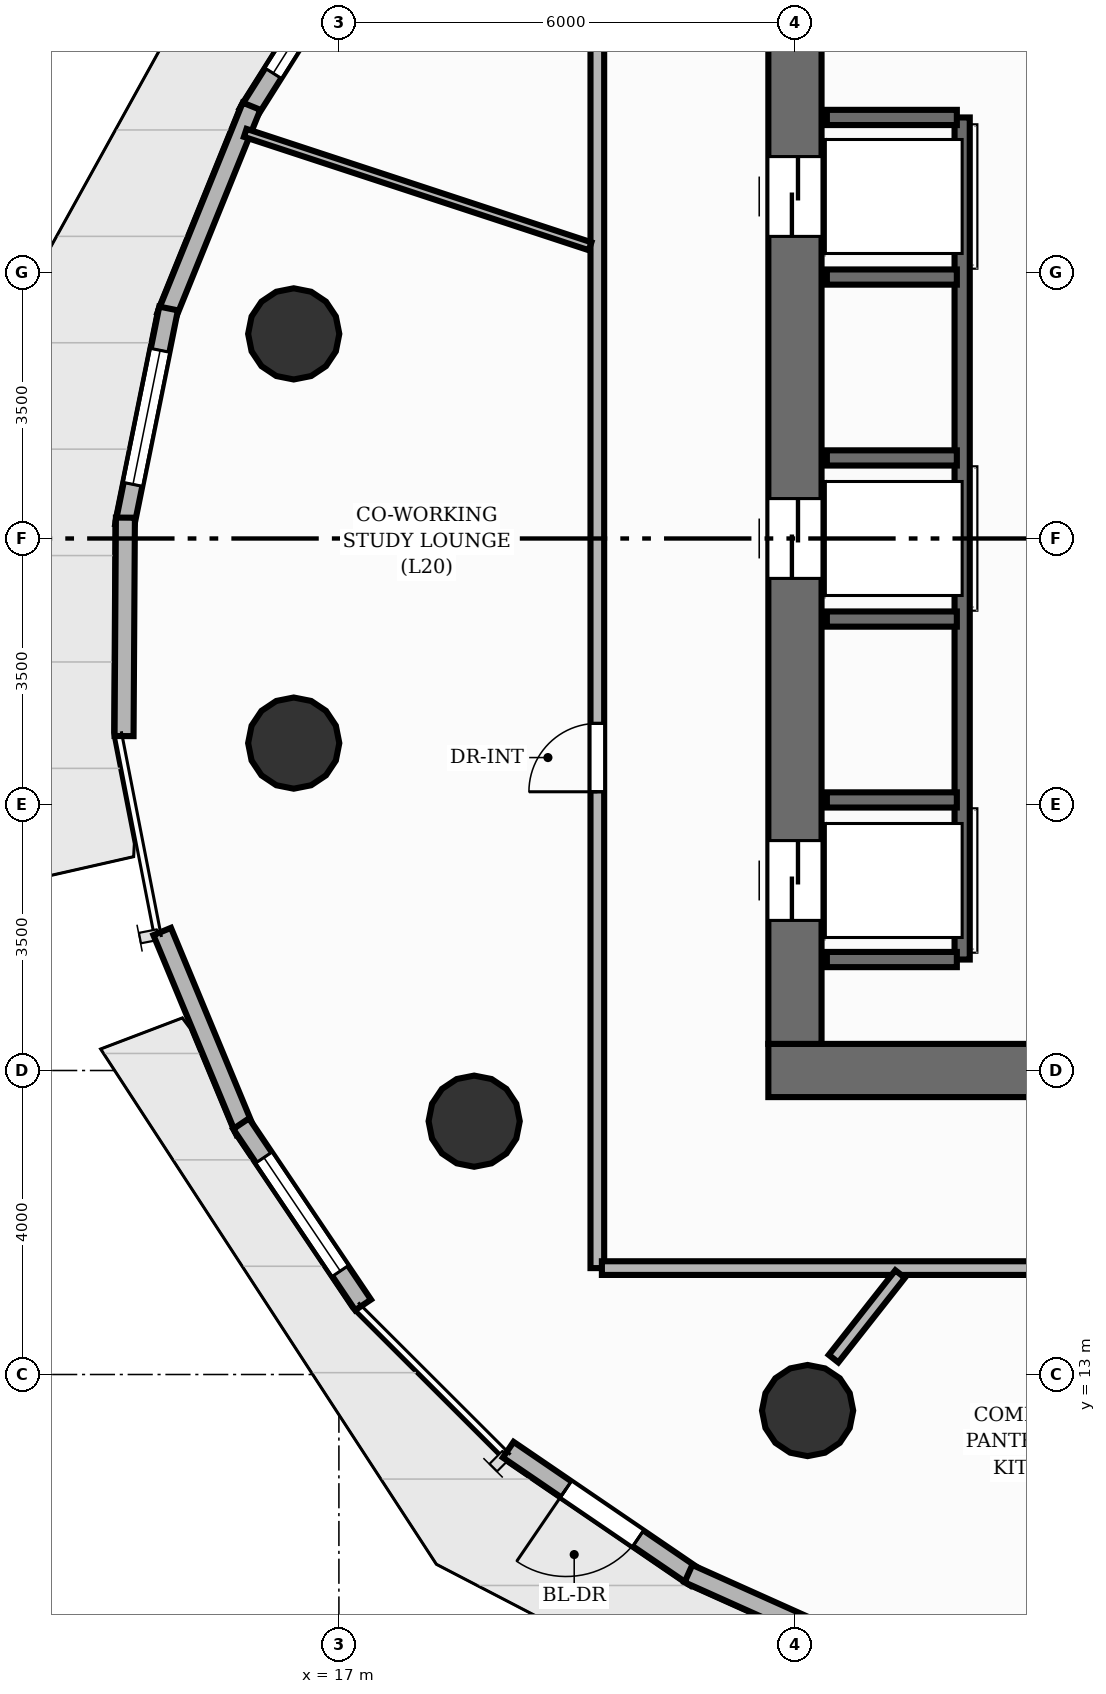
"""IFC4 building model, lengths in metres.
Left out: names, types, materials, properties, quantities, classifications, styles, units other than length and angle.
Written with IfcOpenShell. Run it as: python <this file> out.ifc"""

import sys

from ifc_helpers import new_model, si_unit, direction, frame, frame_2d, origin, origin_2d, place, context, subcontext, project, spatial, rectangle, circle, extrude, element, fill, save


model = new_model("IFC4")
c1 = context("Model", 3, precision=1e-05, world=origin(), true_north=direction((0.0, 1.0)))
c2 = subcontext(c1, "Body", "Model", "MODEL_VIEW")
j1 = project(units=[si_unit("LENGTHUNIT", "METRE"), si_unit("PLANEANGLEUNIT", "RADIAN")], contexts=[c1])
p1 = place(None, origin())
s1 = spatial("IfcSite", under=j1, at=p1, CompositionType="ELEMENT")
p2 = place(p1, origin())
s2 = spatial("IfcBuilding", under=s1, at=p2, CompositionType="ELEMENT")
p3 = place(p2, frame((0.0, 0.0, 70.88)))
s3 = spatial("IfcBuildingStorey", under=s2, at=p3, CompositionType="ELEMENT", Elevation=70.88)
p4 = place(p3, frame((22.65, 17.0, 0.0), z_axis=(0.0, 0.0, 1.0), x_axis=(1.0, 0.0, 0.0)))
e1 = element("IfcWall", 1, at=p4, inside=s3, PredefinedType="SHEAR", context=c2, shape_type="SweptSolid", body=[
    extrude(rectangle(XDim=18.7, YDim=0.7, at=frame_2d((9.35, 0.0))), origin(), (0.0, 0.0, 1.0), 3.2),
])
p5 = place(p4, frame((5.85, 0.0, 0.0)))
e2 = element("IfcOpeningElement", 2, at=p5, cuts=e1, PredefinedType="OPENING", context=c2, shape_type="SweptSolid", body=[
    extrude(rectangle(XDim=1.1, YDim=2.15, at=frame_2d((0.55, 1.075))), frame((0.0, 0.36, 0.0), z_axis=(0.0, -1.0, 0.0), x_axis=(1.0, 0.0, 0.0)), (0.0, 0.0, 1.0), 0.72),
])
p6 = place(p4, frame((9.4, 0.0, 0.0)))
e3 = element("IfcOpeningElement", 3, at=p6, cuts=e1, PredefinedType="OPENING", context=c2, shape_type="SweptSolid", body=[
    extrude(rectangle(XDim=0.9, YDim=2.1, at=frame_2d((0.45, 1.05))), frame((0.0, 0.36, 0.0), z_axis=(0.0, -1.0, 0.0), x_axis=(1.0, 0.0, 0.0)), (0.0, 0.0, 1.0), 0.72),
])
p7 = place(p3, frame((23.0, 17.35, 0.0), z_axis=(0.0, 0.0, 1.0), x_axis=(0.0, 1.0, 0.0)))
e4 = element("IfcWall", 4, at=p7, inside=s3, PredefinedType="SHEAR", context=c2, shape_type="SweptSolid", body=[
    extrude(rectangle(XDim=13.3, YDim=0.7, at=frame_2d((6.65, 0.0))), origin(), (0.0, 0.0, 1.0), 3.2),
])
p8 = place(p7, frame((1.625, 0.0, 0.0)))
e5 = element("IfcOpeningElement", 5, at=p8, cuts=e4, PredefinedType="OPENING", context=c2, shape_type="SweptSolid", body=[
    extrude(rectangle(XDim=1.05, YDim=2.15, at=frame_2d((0.525, 1.075))), frame((0.0, 0.36, 0.0), z_axis=(0.0, -1.0, 0.0), x_axis=(1.0, 0.0, 0.0)), (0.0, 0.0, 1.0), 0.72),
])
p9 = place(p7, frame((6.125, 0.0, 0.0)))
e6 = element("IfcOpeningElement", 6, at=p9, cuts=e4, PredefinedType="OPENING", context=c2, shape_type="SweptSolid", body=[
    extrude(rectangle(XDim=1.05, YDim=2.15, at=frame_2d((0.525, 1.075))), frame((0.0, 0.36, 0.0), z_axis=(0.0, -1.0, 0.0), x_axis=(1.0, 0.0, 0.0)), (0.0, 0.0, 1.0), 0.72),
])
p10 = place(p7, frame((10.625, 0.0, 0.0)))
e7 = element("IfcOpeningElement", 7, at=p10, cuts=e4, PredefinedType="OPENING", context=c2, shape_type="SweptSolid", body=[
    extrude(rectangle(XDim=1.05, YDim=2.15, at=frame_2d((0.525, 1.075))), frame((0.0, 0.36, 0.0), z_axis=(0.0, -1.0, 0.0), x_axis=(1.0, 0.0, 0.0)), (0.0, 0.0, 1.0), 0.72),
])
for number, where, z_axis, x_axis in (
    (8, (16.406, 26.692, 0.0), (0.0, 0.0, 1.0), (1.0, 0.0, 0.0)),
    (9, (16.406, 21.308, 0.0), (0.0, 0.0, 1.0), (1.0, 0.0, 0.0)),
    (10, (18.78, 16.333, 0.0), (0.0, 0.0, 1.0), (1.0, 0.0, 0.0)),
    (11, (23.167, 12.526, 0.0), (0.0, 0.0, 1.0), (1.0, 0.0, 0.0)),
):
    element("IfcColumn", number, at=place(p3, frame(where, z_axis=z_axis, x_axis=x_axis)), inside=s3, PredefinedType="COLUMN", context=c2, shape_type="SweptSolid", body=[
        extrude(circle(Radius=0.6, at=origin_2d()), origin(), (0.0, 0.0, 1.0), 3.2),
    ])
p11 = place(p3, frame((15.799, 29.588, 0.0), z_axis=(0.0, 0.0, 1.0), x_axis=(0.533407635949, 0.845858317871, 0.0)))
e12 = element("IfcWall", 12, at=p11, inside=s3, PredefinedType="SOLIDWALL", context=c2, shape_type="SweptSolid", body=[
    extrude(rectangle(XDim=3.061, YDim=0.25, at=frame_2d((1.53, 0.0))), origin(), (0.0, 0.0, 1.0), 2.96),
])
p12 = place(p11, frame((0.63, 0.0, 0.85)))
e13 = element("IfcOpeningElement", 13, at=p12, cuts=e12, PredefinedType="OPENING", context=c2, shape_type="SweptSolid", body=[
    extrude(rectangle(XDim=1.8, YDim=2.0, at=frame_2d((0.9, 1.0))), frame((0.0, 0.135, 0.0), z_axis=(0.0, -1.0, 0.0), x_axis=(1.0, 0.0, 0.0)), (0.0, 0.0, 1.0), 0.27),
])
p13 = place(p3, frame((14.727, 26.918, 0.0), z_axis=(0.0, 0.0, 1.0), x_axis=(0.376048320415, 0.926600054345, 0.0)))
e14 = element("IfcWall", 14, at=p13, inside=s3, PredefinedType="SOLIDWALL", context=c2, shape_type="SweptSolid", body=[
    extrude(rectangle(XDim=2.988, YDim=0.25, at=frame_2d((1.494, 0.0))), origin(), (0.0, 0.0, 1.0), 2.96),
])
p14 = place(p3, frame((14.179, 24.161, 0.0), z_axis=(0.0, 0.0, 1.0), x_axis=(0.198331811595, 0.980134935868, 0.0)))
e15 = element("IfcWall", 15, at=p14, inside=s3, PredefinedType="SOLIDWALL", context=c2, shape_type="SweptSolid", body=[
    extrude(rectangle(XDim=2.924, YDim=0.25, at=frame_2d((1.462, 0.0))), origin(), (0.0, 0.0, 1.0), 2.96),
])
p15 = place(p14, frame((0.562, 0.0, 0.85)))
e16 = element("IfcOpeningElement", 16, at=p15, cuts=e15, PredefinedType="OPENING", context=c2, shape_type="SweptSolid", body=[
    extrude(rectangle(XDim=1.8, YDim=2.0, at=frame_2d((0.9, 1.0))), frame((0.0, 0.135, 0.0), z_axis=(0.0, -1.0, 0.0), x_axis=(1.0, 0.0, 0.0)), (0.0, 0.0, 1.0), 0.27),
])
p16 = place(p3, frame((14.173, 21.4, 0.0), z_axis=(0.0, 0.0, 1.0), x_axis=(0.006201036057, 0.999980773391, 0.0)))
e17 = element("IfcWall", 17, at=p16, inside=s3, PredefinedType="SOLIDWALL", context=c2, shape_type="SweptSolid", body=[
    extrude(rectangle(XDim=2.874, YDim=0.25, at=frame_2d((1.437, 0.0))), origin(), (0.0, 0.0, 1.0), 2.96),
])
p17 = place(p3, frame((15.767, 16.199, 0.0), z_axis=(0.0, 0.0, 1.0), x_axis=(-0.383525326811, 0.923530358838, 0.0)))
e18 = element("IfcWall", 18, at=p17, inside=s3, PredefinedType="SOLIDWALL", context=c2, shape_type="SweptSolid", body=[
    extrude(rectangle(XDim=2.847, YDim=0.25, at=frame_2d((1.424, 0.0))), origin(), (0.0, 0.0, 1.0), 2.96),
])
p18 = place(p3, frame((17.318, 13.916, 0.0), z_axis=(0.0, 0.0, 1.0), x_axis=(-0.558458439807, 0.829532501478, 0.0)))
e19 = element("IfcWall", 19, at=p18, inside=s3, PredefinedType="SOLIDWALL", context=c2, shape_type="SweptSolid", body=[
    extrude(rectangle(XDim=2.874, YDim=0.25, at=frame_2d((1.437, 0.0))), origin(), (0.0, 0.0, 1.0), 2.96),
])
p19 = place(p18, frame((0.537, 0.0, 0.85)))
e20 = element("IfcOpeningElement", 20, at=p19, cuts=e19, PredefinedType="OPENING", context=c2, shape_type="SweptSolid", body=[
    extrude(rectangle(XDim=1.8, YDim=1.37, at=frame_2d((0.9, 0.685))), frame((0.0, 0.135, 0.0), z_axis=(0.0, -1.0, 0.0), x_axis=(1.0, 0.0, 0.0)), (0.0, 0.0, 1.0), 0.27),
])
p20 = place(p3, frame((21.696, 10.326, 0.0), z_axis=(0.0, 0.0, 1.0), x_axis=(-0.825967987646, 0.56371702421, 0.0)))
e21 = element("IfcWall", 21, at=p20, inside=s3, PredefinedType="SOLIDWALL", context=c2, shape_type="SweptSolid", body=[
    extrude(rectangle(XDim=2.988, YDim=0.25, at=frame_2d((1.494, 0.0))), origin(), (0.0, 0.0, 1.0), 2.96),
])
p21 = place(p20, frame((0.919, 0.0, 0.0)))
e22 = element("IfcOpeningElement", 22, at=p21, cuts=e21, PredefinedType="OPENING", context=c2, shape_type="SweptSolid", body=[
    extrude(rectangle(XDim=1.15, YDim=2.2, at=frame_2d((0.575, 1.1))), frame((0.0, 0.135, 0.0), z_axis=(0.0, -1.0, 0.0), x_axis=(1.0, 0.0, 0.0)), (0.0, 0.0, 1.0), 0.27),
])
p22 = place(p3, frame((24.391, 9.127, 0.0), z_axis=(0.0, 0.0, 1.0), x_axis=(-0.912401485772, 0.40929638254, 0.0)))
e23 = element("IfcWall", 23, at=p22, inside=s3, PredefinedType="SOLIDWALL", context=c2, shape_type="SweptSolid", body=[
    extrude(rectangle(XDim=3.061, YDim=0.25, at=frame_2d((1.53, 0.0))), origin(), (0.0, 0.0, 1.0), 2.96),
])
p23 = place(p3, frame((25.2, 18.46, 0.0), z_axis=(0.0, 0.0, 1.0), x_axis=(0.0, 1.0, 0.0)))
e24 = element("IfcWall", 24, at=p23, inside=s3, PredefinedType="SHEAR", context=c2, shape_type="SweptSolid", body=[
    extrude(rectangle(XDim=11.08, YDim=0.2, at=frame_2d((5.54, 0.0))), origin(), (0.0, 0.0, 1.0), 3.2),
])
for number, where, z_axis, x_axis in (
    (25, (23.42, 18.46, 0.0), (0.0, 0.0, 1.0), (1.0, 0.0, 0.0)),
    (26, (23.42, 29.54, 0.0), (0.0, 0.0, 1.0), (1.0, 0.0, 0.0)),
    (27, (23.42, 20.56, 0.0), (0.0, 0.0, 1.0), (1.0, 0.0, 0.0)),
    (28, (23.42, 22.94, 0.0), (0.0, 0.0, 1.0), (1.0, 0.0, 0.0)),
    (29, (23.42, 25.06, 0.0), (0.0, 0.0, 1.0), (1.0, 0.0, 0.0)),
    (30, (23.42, 27.44, 0.0), (0.0, 0.0, 1.0), (1.0, 0.0, 0.0)),
):
    element("IfcWall", number, at=place(p3, frame(where, z_axis=z_axis, x_axis=x_axis)), inside=s3, PredefinedType="SHEAR", context=c2, shape_type="SweptSolid", body=[
        extrude(rectangle(XDim=1.71, YDim=0.2, at=frame_2d((0.855, 0.0))), origin(), (0.0, 0.0, 1.0), 3.2),
    ])
p24 = place(p3, frame((20.4, 14.4, 0.0), z_axis=(0.0, 0.0, 1.0), x_axis=(0.0, 1.0, 0.0)))
e31 = element("IfcWall", 31, at=p24, inside=s3, PredefinedType="PARTITIONING", context=c2, shape_type="SweptSolid", body=[
    extrude(rectangle(XDim=19.2, YDim=0.18, at=frame_2d((9.6, 0.0))), origin(), (0.0, 0.0, 1.0), 2.955),
])
p25 = place(p24, frame((6.268, 0.0, 0.0)))
e32 = element("IfcOpeningElement", 32, at=p25, cuts=e31, PredefinedType="OPENING", context=c2, shape_type="SweptSolid", body=[
    extrude(rectangle(XDim=0.9, YDim=2.1, at=frame_2d((0.45, 1.05))), frame((0.0, 0.1, 0.0), z_axis=(0.0, -1.0, 0.0), x_axis=(1.0, 0.0, 0.0)), (0.0, 0.0, 1.0), 0.2),
])
p26 = place(p3, frame((43.231, 14.4, 0.0), z_axis=(0.0, 0.0, 1.0), x_axis=(-1.0, 0.0, 0.0)))
e33 = element("IfcWall", 33, at=p26, inside=s3, PredefinedType="PARTITIONING", context=c2, shape_type="SweptSolid", body=[
    extrude(rectangle(XDim=22.771, YDim=0.18, at=frame_2d((11.386, 0.0))), origin(), (0.0, 0.0, 1.0), 2.955),
])
p27 = place(p26, frame((10.968, 0.0, 0.0)))
e34 = element("IfcOpeningElement", 34, at=p27, cuts=e33, PredefinedType="OPENING", context=c2, shape_type="SweptSolid", body=[
    extrude(rectangle(XDim=0.9, YDim=2.1, at=frame_2d((0.45, 1.05))), frame((0.0, 0.1, 0.0), z_axis=(0.0, -1.0, 0.0), x_axis=(1.0, 0.0, 0.0)), (0.0, 0.0, 1.0), 0.2),
])
p28 = place(p26, frame((1.305, 0.0, 0.0)))
e35 = element("IfcOpeningElement", 35, at=p28, cuts=e33, PredefinedType="OPENING", context=c2, shape_type="SweptSolid", body=[
    extrude(rectangle(XDim=0.9, YDim=2.1, at=frame_2d((0.45, 1.05))), frame((0.0, 0.1, 0.0), z_axis=(0.0, -1.0, 0.0), x_axis=(1.0, 0.0, 0.0)), (0.0, 0.0, 1.0), 0.2),
])
p29 = place(p3, frame((20.305, 27.845, 0.0), z_axis=(0.0, 0.0, 1.0), x_axis=(-0.949983665887, 0.312299591013, 0.0)))
e36 = element("IfcWall", 36, at=p29, inside=s3, PredefinedType="MOVABLE", context=c2, shape_type="SweptSolid", body=[
    extrude(rectangle(XDim=4.777, YDim=0.11, at=frame_2d((2.388, 0.0))), origin(), (0.0, 0.0, 1.0), 2.955),
])
p30 = place(p3, frame((24.384, 14.321, 0.0), z_axis=(0.0, 0.0, 1.0), x_axis=(-0.61843050819, -0.785839491589, 0.0)))
e37 = element("IfcWall", 37, at=p30, inside=s3, PredefinedType="PLUMBINGWALL", context=c2, shape_type="SweptSolid", body=[
    extrude(rectangle(XDim=1.416, YDim=0.16, at=frame_2d((0.708, 0.0))), origin(), (0.0, 0.0, 1.0), 2.261),
])
p31 = place(p21, origin())
e38 = element("IfcDoor", 38, at=p31, inside=s3, OperationType="SINGLE_SWING_RIGHT", PredefinedType="DOOR", context=c2, shape_type="SweptSolid", body=[
    extrude(rectangle(XDim=1.15, YDim=2.2, at=frame_2d((0.575, 1.1))), frame((0.0, 0.025, 0.0), z_axis=(0.0, -1.0, 0.0), x_axis=(1.0, 0.0, 0.0)), (0.0, 0.0, 1.0), 0.05),
])
fill(e22, e38)
p32 = place(p12, origin())
e39 = element("IfcWindow", 39, at=p32, inside=s3, PartitioningType="SINGLE_PANEL", PredefinedType="WINDOW", context=c2, shape_type="SweptSolid", body=[
    extrude(rectangle(XDim=1.8, YDim=2.0, at=frame_2d((0.9, 1.0))), frame((0.0, 0.03, 0.0), z_axis=(0.0, -1.0, 0.0), x_axis=(1.0, 0.0, 0.0)), (0.0, 0.0, 1.0), 0.06),
])
fill(e13, e39)
p33 = place(p15, origin())
e40 = element("IfcWindow", 40, at=p33, inside=s3, PartitioningType="SINGLE_PANEL", PredefinedType="WINDOW", context=c2, shape_type="SweptSolid", body=[
    extrude(rectangle(XDim=1.8, YDim=2.0, at=frame_2d((0.9, 1.0))), frame((0.0, 0.03, 0.0), z_axis=(0.0, -1.0, 0.0), x_axis=(1.0, 0.0, 0.0)), (0.0, 0.0, 1.0), 0.06),
])
fill(e16, e40)
p34 = place(p19, origin())
e41 = element("IfcWindow", 41, at=p34, inside=s3, PartitioningType="SINGLE_PANEL", PredefinedType="WINDOW", context=c2, shape_type="SweptSolid", body=[
    extrude(rectangle(XDim=1.8, YDim=1.37, at=frame_2d((0.9, 0.685))), frame((0.0, 0.03, 0.0), z_axis=(0.0, -1.0, 0.0), x_axis=(1.0, 0.0, 0.0)), (0.0, 0.0, 1.0), 0.06),
])
fill(e20, e41)
p35 = place(p8, origin())
e42 = element("IfcDoor", 42, at=p35, inside=s3, OperationType="DOUBLE_DOOR_SLIDING", PredefinedType="DOOR", context=c2, shape_type="SweptSolid", body=[
    extrude(rectangle(XDim=1.05, YDim=2.15, at=frame_2d((0.525, 1.075))), frame((0.0, 0.025, 0.0), z_axis=(0.0, -1.0, 0.0), x_axis=(1.0, 0.0, 0.0)), (0.0, 0.0, 1.0), 0.05),
])
fill(e5, e42)
p36 = place(p9, origin())
e43 = element("IfcDoor", 43, at=p36, inside=s3, OperationType="DOUBLE_DOOR_SLIDING", PredefinedType="DOOR", context=c2, shape_type="SweptSolid", body=[
    extrude(rectangle(XDim=1.05, YDim=2.15, at=frame_2d((0.525, 1.075))), frame((0.0, 0.025, 0.0), z_axis=(0.0, -1.0, 0.0), x_axis=(1.0, 0.0, 0.0)), (0.0, 0.0, 1.0), 0.05),
])
fill(e6, e43)
p37 = place(p10, origin())
e44 = element("IfcDoor", 44, at=p37, inside=s3, OperationType="DOUBLE_DOOR_SLIDING", PredefinedType="DOOR", context=c2, shape_type="SweptSolid", body=[
    extrude(rectangle(XDim=1.05, YDim=2.15, at=frame_2d((0.525, 1.075))), frame((0.0, 0.025, 0.0), z_axis=(0.0, -1.0, 0.0), x_axis=(1.0, 0.0, 0.0)), (0.0, 0.0, 1.0), 0.05),
])
fill(e7, e44)
p38 = place(p25, origin())
e45 = element("IfcDoor", 45, at=p38, inside=s3, OperationType="SINGLE_SWING_LEFT", PredefinedType="DOOR", context=c2, shape_type="SweptSolid", body=[
    extrude(rectangle(XDim=0.9, YDim=2.1, at=frame_2d((0.45, 1.05))), frame((0.0, 0.025, 0.0), z_axis=(0.0, -1.0, 0.0), x_axis=(1.0, 0.0, 0.0)), (0.0, 0.0, 1.0), 0.05),
])
fill(e32, e45)
save(model, sys.argv[1])
